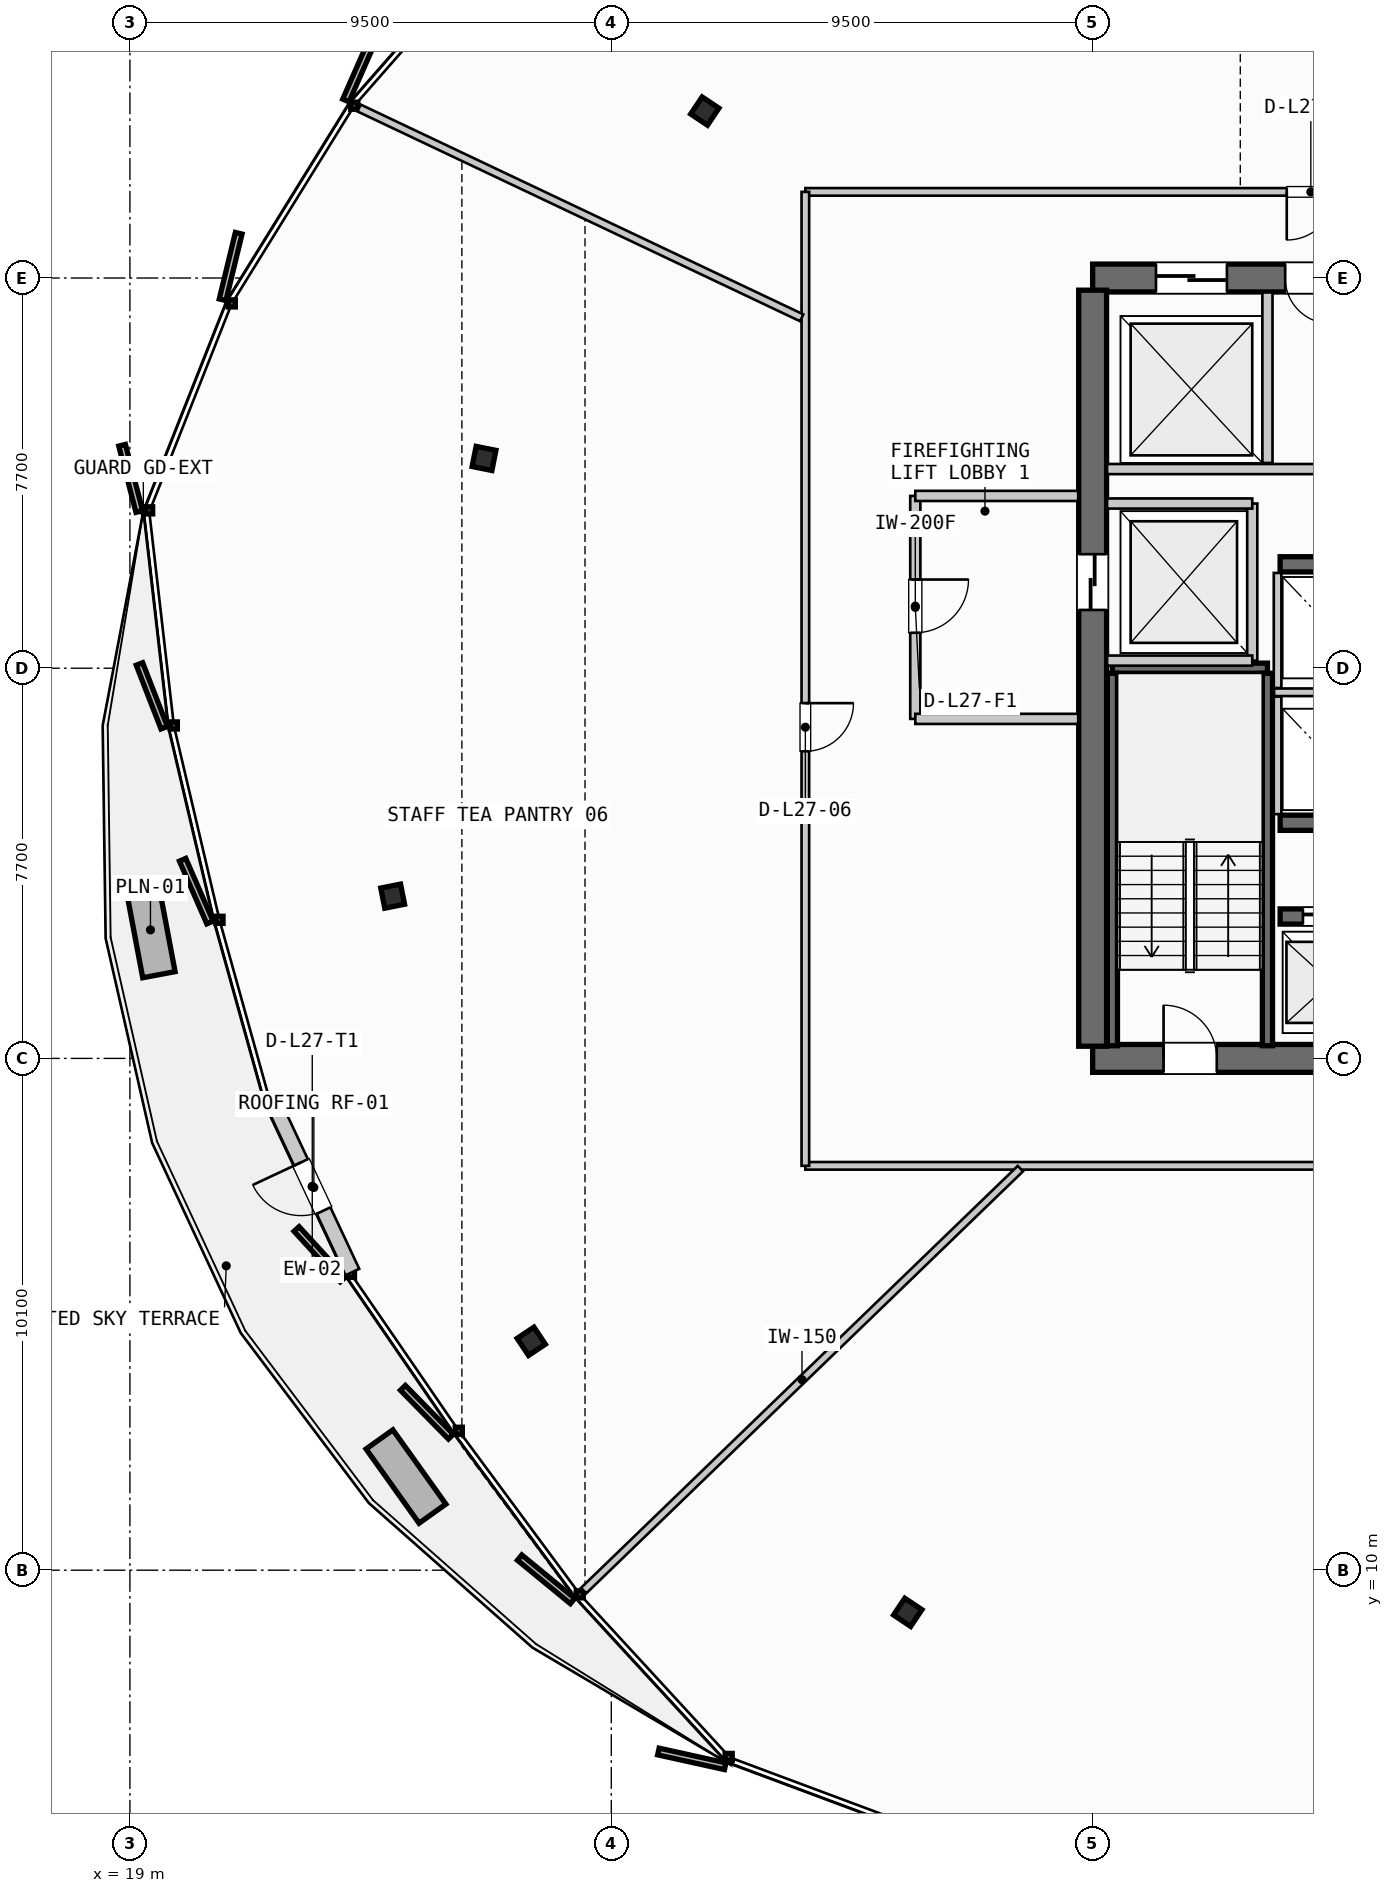
"""IFC4 building model, lengths in metres.
Left out: names, types, materials, properties, quantities, classifications, styles, units other than length and angle.
Written with IfcOpenShell. Run it as: python <this file> out.ifc"""

import sys

from ifc_helpers import new_model, si_unit, direction, frame, frame_2d, origin, origin_2d, place, context, subcontext, project, spatial, rectangle, i_section, extrude, source, transform, mapped, element, fill, save


model = new_model("IFC4")
c1 = context("Model", 3, precision=1e-05, world=origin(), true_north=direction((0.0, 1.0)))
c2 = subcontext(c1, "Body", "Model", "MODEL_VIEW")
j1 = project(units=[si_unit("LENGTHUNIT", "METRE"), si_unit("PLANEANGLEUNIT", "RADIAN")], contexts=[c1])
p1 = place(None, origin())
s1 = spatial("IfcSite", under=j1, at=p1, CompositionType="ELEMENT")
p2 = place(p1, origin())
s2 = spatial("IfcBuilding", under=s1, at=p2, CompositionType="ELEMENT")
p3 = place(p2, frame((0.0, 0.0, 110.8)))
s3 = spatial("IfcBuildingStorey", under=s2, at=p3, CompositionType="ELEMENT", Elevation=110.8)
p4 = place(p3, frame((38.0, 20.1, 0.0), z_axis=(0.0, 0.0, 1.0), x_axis=(1.0, 0.0, 0.0)))
e1 = element("IfcWall", 1, at=p4, inside=s3, PredefinedType="SHEAR", context=c2, shape_type="SweptSolid", body=[
    extrude(rectangle(XDim=17.6, YDim=0.55, at=frame_2d((8.8, 0.0))), origin(), (0.0, 0.0, 1.0), 3.35),
])
p5 = place(p4, frame((1.4, 0.0, 0.0)))
e2 = element("IfcOpeningElement", 2, at=p5, cuts=e1, PredefinedType="OPENING", context=c2, shape_type="SweptSolid", body=[
    extrude(rectangle(XDim=1.05, YDim=2.15, at=frame_2d((0.525, 1.075))), frame((0.0, 0.285, 0.0), z_axis=(0.0, -1.0, 0.0), x_axis=(1.0, 0.0, 0.0)), (0.0, 0.0, 1.0), 0.57),
])
p6 = place(p4, frame((15.15, 0.0, 0.0)))
e3 = element("IfcOpeningElement", 3, at=p6, cuts=e1, PredefinedType="OPENING", context=c2, shape_type="SweptSolid", body=[
    extrude(rectangle(XDim=1.05, YDim=2.15, at=frame_2d((0.525, 1.075))), frame((0.0, 0.285, 0.0), z_axis=(0.0, -1.0, 0.0), x_axis=(1.0, 0.0, 0.0)), (0.0, 0.0, 1.0), 0.57),
])
p7 = place(p3, frame((55.6, 35.5, 0.0), z_axis=(0.0, 0.0, 1.0), x_axis=(-1.0, 0.0, 0.0)))
e4 = element("IfcWall", 4, at=p7, inside=s3, PredefinedType="SHEAR", context=c2, shape_type="SweptSolid", body=[
    extrude(rectangle(XDim=17.6, YDim=0.55, at=frame_2d((8.8, 0.0))), origin(), (0.0, 0.0, 1.0), 3.35),
])
p8 = place(p7, frame((8.05, 0.0, 0.0)))
e5 = element("IfcOpeningElement", 5, at=p8, cuts=e4, PredefinedType="OPENING", context=c2, shape_type="SweptSolid", body=[
    extrude(rectangle(XDim=1.5, YDim=2.2, at=frame_2d((0.75, 1.1))), frame((0.0, 0.285, 0.0), z_axis=(0.0, -1.0, 0.0), x_axis=(1.0, 0.0, 0.0)), (0.0, 0.0, 1.0), 0.57),
])
p9 = place(p7, frame((14.95, 0.0, 0.0)))
e6 = element("IfcOpeningElement", 6, at=p9, cuts=e4, PredefinedType="OPENING", context=c2, shape_type="SweptSolid", body=[
    extrude(rectangle(XDim=1.4, YDim=2.3, at=frame_2d((0.7, 1.15))), frame((0.0, 0.285, 0.0), z_axis=(0.0, -1.0, 0.0), x_axis=(1.0, 0.0, 0.0)), (0.0, 0.0, 1.0), 0.57),
])
p10 = place(p7, frame((12.9, 0.0, 0.0)))
e7 = element("IfcOpeningElement", 7, at=p10, cuts=e4, PredefinedType="OPENING", context=c2, shape_type="SweptSolid", body=[
    extrude(rectangle(XDim=0.9, YDim=2.15, at=frame_2d((0.45, 1.075))), frame((0.0, 0.285, 0.0), z_axis=(0.0, -1.0, 0.0), x_axis=(1.0, 0.0, 0.0)), (0.0, 0.0, 1.0), 0.57),
])
p11 = place(p7, frame((10.6, 0.0, 0.0)))
e8 = element("IfcOpeningElement", 8, at=p11, cuts=e4, PredefinedType="OPENING", context=c2, shape_type="SweptSolid", body=[
    extrude(rectangle(XDim=0.95, YDim=2.15, at=frame_2d((0.475, 1.075))), frame((0.0, 0.285, 0.0), z_axis=(0.0, -1.0, 0.0), x_axis=(1.0, 0.0, 0.0)), (0.0, 0.0, 1.0), 0.57),
])
p12 = place(p3, frame((38.0, 35.26, 0.0), z_axis=(0.0, 0.0, 1.0), x_axis=(0.0, -1.0, 0.0)))
e9 = element("IfcWall", 9, at=p12, inside=s3, PredefinedType="SHEAR", context=c2, shape_type="SweptSolid", body=[
    extrude(rectangle(XDim=14.92, YDim=0.55, at=frame_2d((7.46, 0.0))), origin(), (0.0, 0.0, 1.0), 3.35),
])
p13 = place(p12, frame((5.21, 0.0, 0.0)))
e10 = element("IfcOpeningElement", 10, at=p13, cuts=e9, PredefinedType="OPENING", context=c2, shape_type="SweptSolid", body=[
    extrude(rectangle(XDim=1.1, YDim=2.2, at=frame_2d((0.55, 1.1))), frame((0.0, 0.285, 0.0), z_axis=(0.0, -1.0, 0.0), x_axis=(1.0, 0.0, 0.0)), (0.0, 0.0, 1.0), 0.57),
])
p14 = place(p3, frame((41.7, 22.9, 0.0), z_axis=(0.0, 0.0, 1.0), x_axis=(1.0, 0.0, 0.0)))
e11 = element("IfcWall", 11, at=p14, inside=s3, PredefinedType="SHEAR", context=c2, shape_type="SweptSolid", body=[
    extrude(rectangle(XDim=4.25, YDim=0.3, at=frame_2d((2.125, 0.0))), origin(), (0.0, 0.0, 1.0), 3.35),
])
p15 = place(p14, frame((0.45, 0.0, 0.0)))
e12 = element("IfcOpeningElement", 12, at=p15, cuts=e11, PredefinedType="OPENING", context=c2, shape_type="SweptSolid", body=[
    extrude(rectangle(XDim=1.1, YDim=2.2, at=frame_2d((0.55, 1.1))), frame((0.0, 0.16, 0.0), z_axis=(0.0, -1.0, 0.0), x_axis=(1.0, 0.0, 0.0)), (0.0, 0.0, 1.0), 0.32),
])
p16 = place(p14, frame((2.5, 0.0, 0.0)))
e13 = element("IfcOpeningElement", 13, at=p16, cuts=e11, PredefinedType="OPENING", context=c2, shape_type="SweptSolid", body=[
    extrude(rectangle(XDim=1.1, YDim=2.2, at=frame_2d((0.55, 1.1))), frame((0.0, 0.16, 0.0), z_axis=(0.0, -1.0, 0.0), x_axis=(1.0, 0.0, 0.0)), (0.0, 0.0, 1.0), 0.32),
])
for number, where, z_axis, x_axis in (
    (14, (41.7, 24.75, 0.0), (0.0, 0.0, 1.0), (1.0, 0.0, 0.0)),
    (15, (41.7, 29.85, 0.0), (0.0, 0.0, 1.0), (1.0, 0.0, 0.0)),
):
    element("IfcWall", number, at=place(p3, frame(where, z_axis=z_axis, x_axis=x_axis)), inside=s3, PredefinedType="SHEAR", context=c2, shape_type="SweptSolid", body=[
        extrude(rectangle(XDim=4.25, YDim=0.3, at=frame_2d((2.125, 0.0))), origin(), (0.0, 0.0, 1.0), 3.35),
    ])
m1 = source(origin(), c2, "Body", "SweptSolid", [
    extrude(i_section(OverallWidth=0.405, OverallDepth=0.398, WebThickness=0.035, FlangeThickness=0.056, FilletRadius=0.015, at=origin_2d()), origin(), (0.0, 0.0, 1.0), 3.35),
])
for number, where, z_axis, x_axis in (
    (16, (30.346, 38.794, 0.0), (0.0, 0.0, 1.0), (-0.831, 0.556, 0.0)),
    (17, (25.989, 31.94, 0.0), (0.0, 0.0, 1.0), (-0.981, 0.195, 0.0)),
    (18, (24.185, 23.302, 0.0), (0.0, 0.0, 1.0), (-0.981, -0.195, 0.0)),
    (19, (26.921, 14.517, 0.0), (0.0, 0.0, 1.0), (-0.831, -0.556, 0.0)),
    (20, (34.351, 9.168, 0.0), (0.0, 0.0, 1.0), (-0.556, -0.831, 0.0)),
):
    element("IfcColumn", number, at=place(p3, frame(where, z_axis=z_axis, x_axis=x_axis)), inside=s3, PredefinedType="COLUMN", context=c2, shape_type="MappedRepresentation", body=[
        mapped(m1, transform((0.0, 0.0, 0.0), scale=1.0)),
    ])
p17 = place(p3, frame((23.39, 15.883, 0.0), z_axis=(0.0, 0.0, 1.0), x_axis=(-0.4244003421, 0.905474654325, 0.0)))
e21 = element("IfcWall", 21, at=p17, inside=s3, PredefinedType="SOLIDWALL", context=c2, shape_type="SweptSolid", body=[
    extrude(rectangle(XDim=3.73, YDim=0.3, at=frame_2d((1.865, 0.0))), origin(), (0.0, 0.0, 1.0), 2.775),
])
p18 = place(p17, frame((1.34, 0.0, 0.0)))
e22 = element("IfcOpeningElement", 22, at=p18, cuts=e21, PredefinedType="OPENING", context=c2, shape_type="SweptSolid", body=[
    extrude(rectangle(XDim=1.05, YDim=2.2, at=frame_2d((0.525, 1.1))), frame((0.0, 0.16, 0.0), z_axis=(0.0, -1.0, 0.0), x_axis=(1.0, 0.0, 0.0)), (0.0, 0.0, 1.0), 0.32),
])
p19 = place(p3, frame((38.39, 27.8, 0.0), z_axis=(0.0, 0.0, 1.0), x_axis=(1.0, 0.0, 0.0)))
e23 = element("IfcWall", 23, at=p19, inside=s3, PredefinedType="SHEAR", context=c2, shape_type="SweptSolid", body=[
    extrude(rectangle(XDim=3.06, YDim=0.2, at=frame_2d((1.53, 0.0))), origin(), (0.0, 0.0, 1.0), 3.35),
])
for number, where, z_axis, x_axis in (
    (24, (41.45, 27.7, 0.0), (0.0, 0.0, 1.0), (0.0, -1.0, 0.0)),
    (25, (38.39, 20.35, 0.0), (0.0, 0.0, 1.0), (0.0, 1.0, 0.0)),
):
    element("IfcWall", number, at=place(p3, frame(where, z_axis=z_axis, x_axis=x_axis)), inside=s3, PredefinedType="SHEAR", context=c2, shape_type="SweptSolid", body=[
        extrude(rectangle(XDim=7.35, YDim=0.2, at=frame_2d((3.675, 0.0))), origin(), (0.0, 0.0, 1.0), 3.35),
    ])
p20 = place(p3, frame((41.15, 27.95, 0.0), z_axis=(0.0, 0.0, 1.0), x_axis=(0.0, 1.0, 0.0)))
e26 = element("IfcWall", 26, at=p20, inside=s3, PredefinedType="PARTITIONING", context=c2, shape_type="SweptSolid", body=[
    extrude(rectangle(XDim=3.1, YDim=0.2, at=frame_2d((1.55, 0.0))), origin(), (0.0, 0.0, 1.0), 2.28),
])
for number, where, z_axis, x_axis in (
    (27, (38.285, 27.95, 0.0), (0.0, 0.0, 1.0), (1.0, 0.0, 0.0)),
    (28, (38.285, 31.05, 0.0), (0.0, 0.0, 1.0), (1.0, 0.0, 0.0)),
):
    element("IfcWall", number, at=place(p3, frame(where, z_axis=z_axis, x_axis=x_axis)), inside=s3, PredefinedType="PARTITIONING", context=c2, shape_type="SweptSolid", body=[
        extrude(rectangle(XDim=2.865, YDim=0.2, at=frame_2d((1.433, 0.0))), origin(), (0.0, 0.0, 1.0), 2.28),
    ])
p21 = place(p3, frame((34.5, 31.2, 0.0), z_axis=(0.0, 0.0, 1.0), x_axis=(0.0, -1.0, 0.0)))
e29 = element("IfcWall", 29, at=p21, inside=s3, PredefinedType="PARTITIONING", context=c2, shape_type="SweptSolid", body=[
    extrude(rectangle(XDim=4.4, YDim=0.2, at=frame_2d((2.2, 0.0))), origin(), (0.0, 0.0, 1.0), 2.28),
])
p22 = place(p21, frame((1.65, 0.0, 0.0)))
e30 = element("IfcOpeningElement", 30, at=p22, cuts=e29, PredefinedType="OPENING", context=c2, shape_type="SweptSolid", body=[
    extrude(rectangle(XDim=1.05, YDim=2.15, at=frame_2d((0.525, 1.075))), frame((0.0, 0.11, 0.0), z_axis=(0.0, -1.0, 0.0), x_axis=(1.0, 0.0, 0.0)), (0.0, 0.0, 1.0), 0.22),
])
for number, where, z_axis, x_axis in (
    (31, (34.5, 26.8, 0.0), (0.0, 0.0, 1.0), (1.0, 0.0, 0.0)),
    (32, (34.5, 31.2, 0.0), (0.0, 0.0, 1.0), (1.0, 0.0, 0.0)),
):
    element("IfcWall", number, at=place(p3, frame(where, z_axis=z_axis, x_axis=x_axis)), inside=s3, PredefinedType="PARTITIONING", context=c2, shape_type="SweptSolid", body=[
        extrude(rectangle(XDim=3.215, YDim=0.2, at=frame_2d((1.607, 0.0))), origin(), (0.0, 0.0, 1.0), 2.28),
    ])
p23 = place(p3, frame((41.58, 27.325, 0.0), z_axis=(0.0, 0.0, 1.0), x_axis=(1.0, 0.0, 0.0)))
e33 = element("IfcWall", 33, at=p23, inside=s3, PredefinedType="PARTITIONING", context=c2, shape_type="SweptSolid", body=[
    extrude(rectangle(XDim=4.32, YDim=0.15, at=frame_2d((2.16, 0.0))), origin(), (0.0, 0.0, 1.0), 2.28),
])
p24 = place(p3, frame((41.65, 24.92, 0.0), z_axis=(0.0, 0.0, 1.0), x_axis=(0.0, 1.0, 0.0)))
e34 = element("IfcWall", 34, at=p24, inside=s3, PredefinedType="PARTITIONING", context=c2, shape_type="SweptSolid", body=[
    extrude(rectangle(XDim=2.32, YDim=0.15, at=frame_2d((1.16, 0.0))), origin(), (0.0, 0.0, 1.0), 2.28),
])
p25 = place(p3, frame((41.65, 27.41, 0.0), z_axis=(0.0, 0.0, 1.0), x_axis=(0.0, 1.0, 0.0)))
e35 = element("IfcWall", 35, at=p25, inside=s3, PredefinedType="PARTITIONING", context=c2, shape_type="SweptSolid", body=[
    extrude(rectangle(XDim=2.27, YDim=0.15, at=frame_2d((1.135, 0.0))), origin(), (0.0, 0.0, 1.0), 2.28),
])
p26 = place(p3, frame((41.45, 31.85, 0.0), z_axis=(0.0, 0.0, 1.0), x_axis=(0.0, 1.0, 0.0)))
e36 = element("IfcWall", 36, at=p26, inside=s3, PredefinedType="PARTITIONING", context=c2, shape_type="SweptSolid", body=[
    extrude(rectangle(XDim=3.365, YDim=0.2, at=frame_2d((1.683, 0.0))), origin(), (0.0, 0.0, 1.0), 2.28),
])
p27 = place(p3, frame((38.285, 31.73, 0.0), z_axis=(0.0, 0.0, 1.0), x_axis=(1.0, 0.0, 0.0)))
e37 = element("IfcWall", 37, at=p27, inside=s3, PredefinedType="PARTITIONING", context=c2, shape_type="SweptSolid", body=[
    extrude(rectangle(XDim=7.515, YDim=0.2, at=frame_2d((3.758, 0.0))), origin(), (0.0, 0.0, 1.0), 2.28),
])
p28 = place(p3, frame((32.33, 17.98, 0.0), z_axis=(0.0, 0.0, 1.0), x_axis=(1.0, 0.0, 0.0)))
e38 = element("IfcWall", 38, at=p28, inside=s3, PredefinedType="PARTITIONING", context=c2, shape_type="SweptSolid", body=[
    extrude(rectangle(XDim=30.5, YDim=0.15, at=frame_2d((15.25, 0.0))), origin(), (0.0, 0.0, 1.0), 2.28),
])
p29 = place(p28, frame((13.482, 0.0, 0.0)))
e39 = element("IfcOpeningElement", 39, at=p29, cuts=e38, PredefinedType="OPENING", context=c2, shape_type="SweptSolid", body=[
    extrude(rectangle(XDim=0.95, YDim=2.15, at=frame_2d((0.475, 1.075))), frame((0.0, 0.085, 0.0), z_axis=(0.0, -1.0, 0.0), x_axis=(1.0, 0.0, 0.0)), (0.0, 0.0, 1.0), 0.17),
])
p30 = place(p3, frame((62.83, 37.2, 0.0), z_axis=(0.0, 0.0, 1.0), x_axis=(-1.0, 0.0, 0.0)))
e40 = element("IfcWall", 40, at=p30, inside=s3, PredefinedType="PARTITIONING", context=c2, shape_type="SweptSolid", body=[
    extrude(rectangle(XDim=30.5, YDim=0.15, at=frame_2d((15.25, 0.0))), origin(), (0.0, 0.0, 1.0), 2.28),
])
p31 = place(p30, frame((5.396, 0.0, 0.0)))
e41 = element("IfcOpeningElement", 41, at=p31, cuts=e40, PredefinedType="OPENING", context=c2, shape_type="SweptSolid", body=[
    extrude(rectangle(XDim=0.95, YDim=2.15, at=frame_2d((0.475, 1.075))), frame((0.0, 0.085, 0.0), z_axis=(0.0, -1.0, 0.0), x_axis=(1.0, 0.0, 0.0)), (0.0, 0.0, 1.0), 0.17),
])
p32 = place(p30, frame((20.049, 0.0, 0.0)))
e42 = element("IfcOpeningElement", 42, at=p32, cuts=e40, PredefinedType="OPENING", context=c2, shape_type="SweptSolid", body=[
    extrude(rectangle(XDim=0.95, YDim=2.15, at=frame_2d((0.475, 1.075))), frame((0.0, 0.085, 0.0), z_axis=(0.0, -1.0, 0.0), x_axis=(1.0, 0.0, 0.0)), (0.0, 0.0, 1.0), 0.17),
])
p33 = place(p3, frame((32.33, 37.2, 0.0), z_axis=(0.0, 0.0, 1.0), x_axis=(0.0, -1.0, 0.0)))
e43 = element("IfcWall", 43, at=p33, inside=s3, PredefinedType="PARTITIONING", context=c2, shape_type="SweptSolid", body=[
    extrude(rectangle(XDim=19.22, YDim=0.15, at=frame_2d((9.61, 0.0))), origin(), (0.0, 0.0, 1.0), 2.28),
])
p34 = place(p33, frame((10.09, 0.0, 0.0)))
e44 = element("IfcOpeningElement", 44, at=p34, cuts=e43, PredefinedType="OPENING", context=c2, shape_type="SweptSolid", body=[
    extrude(rectangle(XDim=0.95, YDim=2.15, at=frame_2d((0.475, 1.075))), frame((0.0, 0.085, 0.0), z_axis=(0.0, -1.0, 0.0), x_axis=(1.0, 0.0, 0.0)), (0.0, 0.0, 1.0), 0.17),
])
p35 = place(p3, frame((36.573, 17.924, 0.0), z_axis=(0.0, 0.0, 1.0), x_axis=(-0.719183453683, -0.694820235708, 0.0)))
e45 = element("IfcWall", 45, at=p35, inside=s3, PredefinedType="PARTITIONING", context=c2, shape_type="SweptSolid", body=[
    extrude(rectangle(XDim=11.985, YDim=0.15, at=frame_2d((5.992, 0.0))), origin(), (0.0, 0.0, 1.0), 2.28),
])
p36 = place(p3, frame((32.258, 34.715, 0.0), z_axis=(0.0, 0.0, 1.0), x_axis=(-0.90364422313, 0.428283922187, 0.0)))
e46 = element("IfcWall", 46, at=p36, inside=s3, PredefinedType="PARTITIONING", context=c2, shape_type="SweptSolid", body=[
    extrude(rectangle(XDim=9.667, YDim=0.15, at=frame_2d((4.833, 0.0))), origin(), (0.0, 0.0, 1.0), 2.28),
])
m2 = source(origin(), c2, "Body", "SweptSolid", [
    extrude(rectangle(XDim=1.05, YDim=2.2, at=frame_2d((0.525, 1.1))), frame((0.0, 0.025, 0.0), z_axis=(0.0, -1.0, 0.0), x_axis=(1.0, 0.0, 0.0)), (0.0, 0.0, 1.0), 0.05),
])
p37 = place(p18, origin())
e47 = element("IfcDoor", 47, at=p37, inside=s3, OperationType="SINGLE_SWING_RIGHT", PredefinedType="DOOR", context=c2, shape_type="MappedRepresentation", body=[
    mapped(m2, transform((0.0, 0.0, 0.0), scale=1.0)),
])
fill(e22, e47)
m3 = source(origin(), c2, "Body", "SweptSolid", [
    extrude(rectangle(XDim=1.05, YDim=2.15, at=frame_2d((0.525, 1.075))), frame((0.0, 0.025, 0.0), z_axis=(0.0, -1.0, 0.0), x_axis=(1.0, 0.0, 0.0)), (0.0, 0.0, 1.0), 0.05),
])
p38 = place(p5, origin())
e48 = element("IfcDoor", 48, at=p38, inside=s3, OperationType="SINGLE_SWING_LEFT", PredefinedType="DOOR", context=c2, shape_type="MappedRepresentation", body=[
    mapped(m3, transform((0.0, 0.0, 0.0), scale=1.0)),
])
fill(e2, e48)
m4 = source(origin(), c2, "Body", "SweptSolid", [
    extrude(rectangle(XDim=1.1, YDim=2.2, at=frame_2d((0.55, 1.1))), frame((0.0, 0.025, 0.0), z_axis=(0.0, -1.0, 0.0), x_axis=(1.0, 0.0, 0.0)), (0.0, 0.0, 1.0), 0.05),
])
p39 = place(p13, origin())
e49 = element("IfcDoor", 49, at=p39, inside=s3, OperationType="SLIDING_TO_LEFT", PredefinedType="DOOR", context=c2, shape_type="MappedRepresentation", body=[
    mapped(m4, transform((0.0, 0.0, 0.0), scale=1.0)),
])
fill(e10, e49)
p40 = place(p15, origin())
e50 = element("IfcDoor", 50, at=p40, inside=s3, OperationType="SLIDING_TO_LEFT", PredefinedType="DOOR", context=c2, shape_type="MappedRepresentation", body=[
    mapped(m4, transform((0.0, 0.0, 0.0), scale=1.0)),
])
fill(e12, e50)
m5 = source(origin(), c2, "Body", "SweptSolid", [
    extrude(rectangle(XDim=1.4, YDim=2.3, at=frame_2d((0.7, 1.15))), frame((0.0, 0.025, 0.0), z_axis=(0.0, -1.0, 0.0), x_axis=(1.0, 0.0, 0.0)), (0.0, 0.0, 1.0), 0.05),
])
p41 = place(p9, origin())
e51 = element("IfcDoor", 51, at=p41, inside=s3, OperationType="SLIDING_TO_RIGHT", PredefinedType="DOOR", context=c2, shape_type="MappedRepresentation", body=[
    mapped(m5, transform((0.0, 0.0, 0.0), scale=1.0)),
])
fill(e6, e51)
m6 = source(origin(), c2, "Body", "SweptSolid", [
    extrude(rectangle(XDim=0.9, YDim=2.15, at=frame_2d((0.45, 1.075))), frame((0.0, 0.025, 0.0), z_axis=(0.0, -1.0, 0.0), x_axis=(1.0, 0.0, 0.0)), (0.0, 0.0, 1.0), 0.05),
])
p42 = place(p10, origin())
e52 = element("IfcDoor", 52, at=p42, inside=s3, OperationType="SINGLE_SWING_LEFT", PredefinedType="DOOR", context=c2, shape_type="MappedRepresentation", body=[
    mapped(m6, transform((0.0, 0.0, 0.0), scale=1.0)),
])
fill(e7, e52)
p43 = place(p22, origin())
e53 = element("IfcDoor", 53, at=p43, inside=s3, OperationType="SINGLE_SWING_LEFT", PredefinedType="DOOR", context=c2, shape_type="MappedRepresentation", body=[
    mapped(m3, transform((0.0, 0.0, 0.0), scale=1.0)),
])
fill(e30, e53)
m7 = source(origin(), c2, "Body", "SweptSolid", [
    extrude(rectangle(XDim=0.95, YDim=2.15, at=frame_2d((0.475, 1.075))), frame((0.0, 0.025, 0.0), z_axis=(0.0, -1.0, 0.0), x_axis=(1.0, 0.0, 0.0)), (0.0, 0.0, 1.0), 0.05),
])
p44 = place(p32, origin())
e54 = element("IfcDoor", 54, at=p44, inside=s3, OperationType="SINGLE_SWING_RIGHT", PredefinedType="DOOR", context=c2, shape_type="MappedRepresentation", body=[
    mapped(m7, transform((0.0, 0.0, 0.0), scale=1.0)),
])
fill(e42, e54)
p45 = place(p34, origin())
e55 = element("IfcDoor", 55, at=p45, inside=s3, OperationType="SINGLE_SWING_LEFT", PredefinedType="DOOR", context=c2, shape_type="MappedRepresentation", body=[
    mapped(m7, transform((0.0, 0.0, 0.0), scale=1.0)),
])
fill(e44, e55)
save(model, sys.argv[1])
